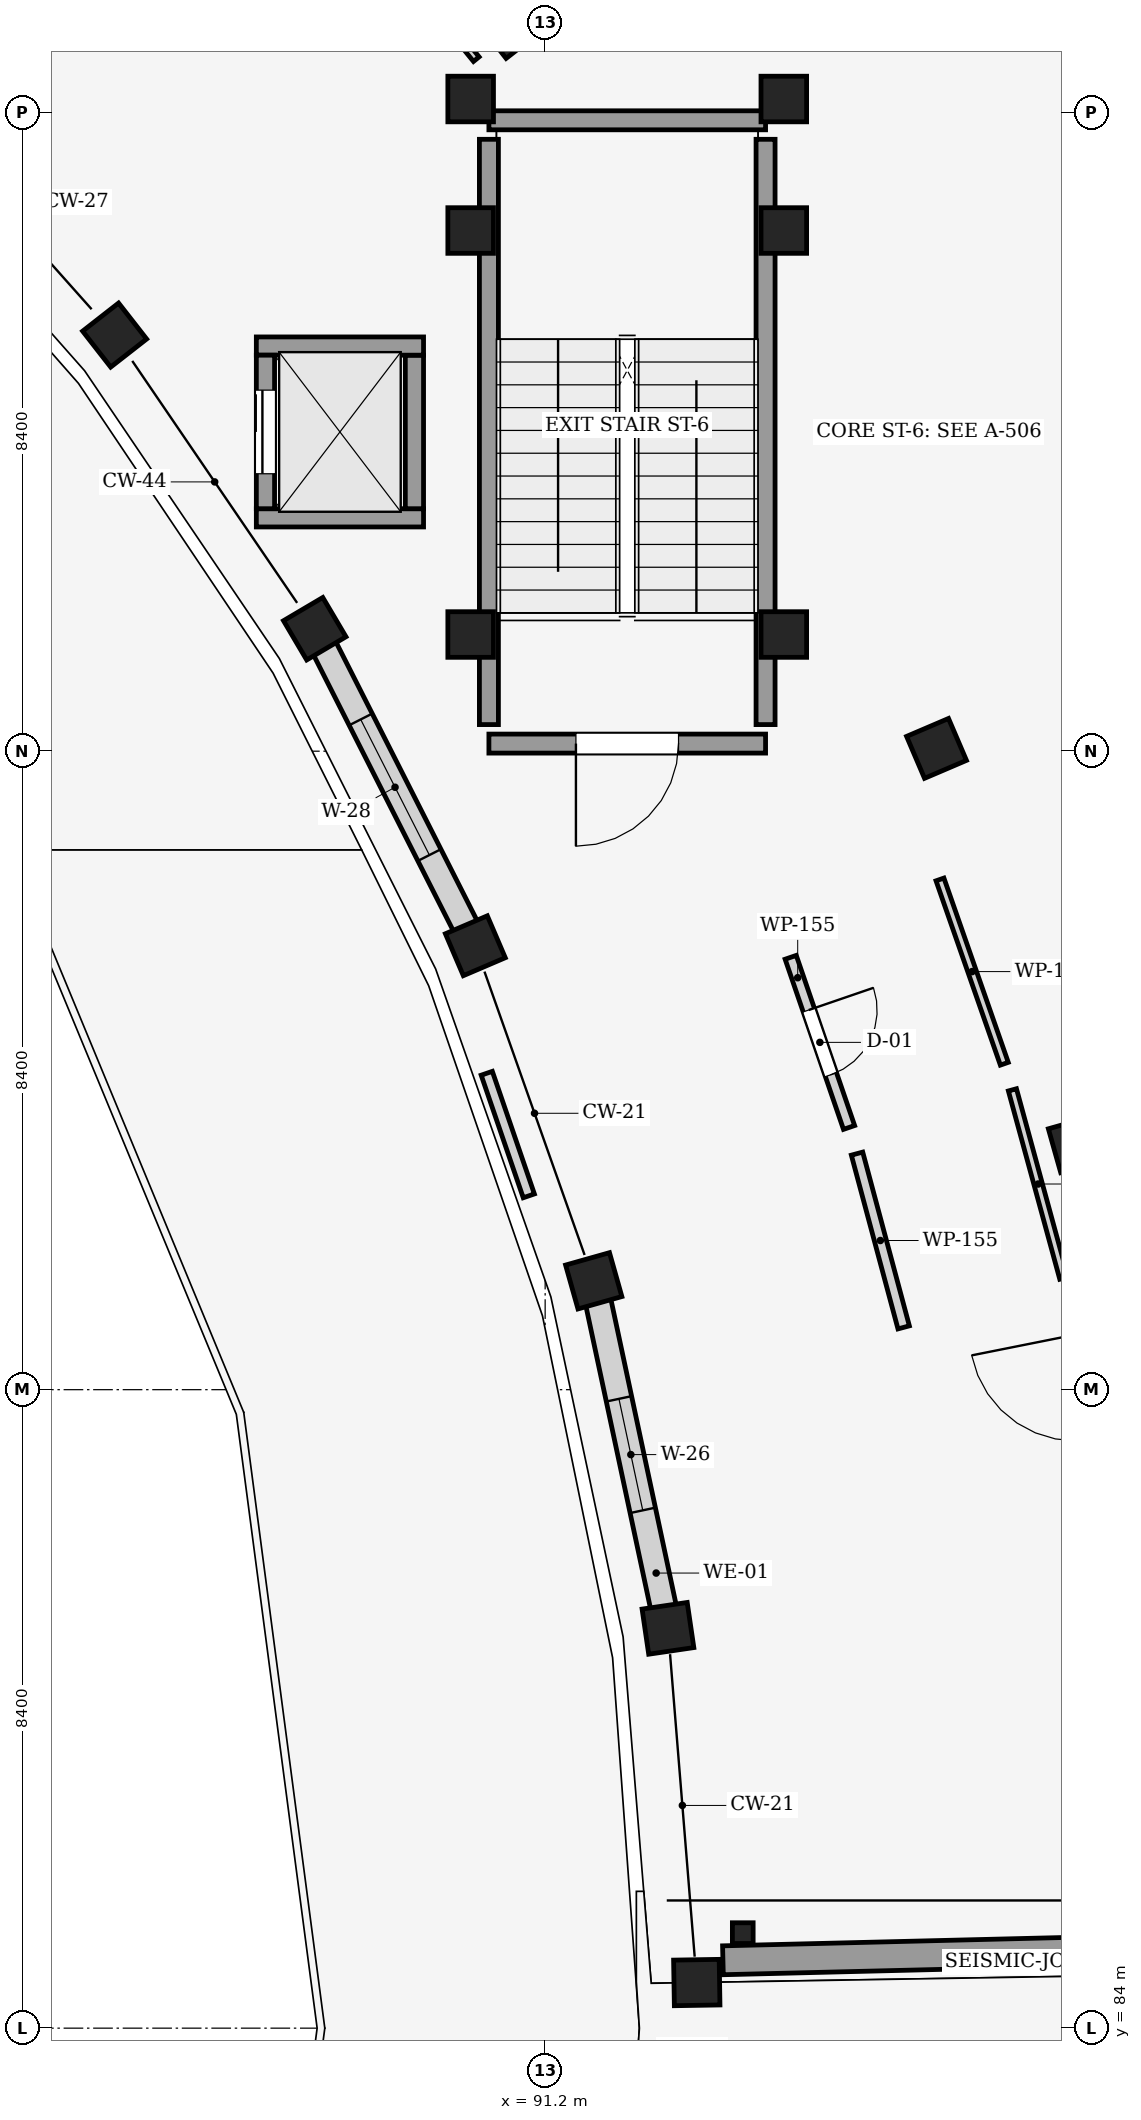
"""IFC4 building model, lengths in metres.
Left out: names, types, materials, properties, quantities, classifications, styles, units other than length and angle.
Written with IfcOpenShell. Run it as: python <this file> out.ifc"""

import sys

from ifc_helpers import new_model, si_unit, direction, frame, frame_2d, origin, origin_2d, place, context, subcontext, project, spatial, rectangle, hollow_circle, extrude, element, fill, save


model = new_model("IFC4")
c1 = context("Model", 3, precision=1e-05, world=origin(), true_north=direction((0.0, 1.0)))
c2 = subcontext(c1, "Body", "Model", "MODEL_VIEW")
j1 = project(units=[si_unit("LENGTHUNIT", "METRE"), si_unit("PLANEANGLEUNIT", "RADIAN")], contexts=[c1])
p1 = place(None, origin())
s1 = spatial("IfcSite", under=j1, at=p1, CompositionType="ELEMENT")
p2 = place(p1, origin())
s2 = spatial("IfcBuilding", under=s1, at=p2, CompositionType="ELEMENT")
p3 = place(p2, frame((0.0, 0.0, 9.15)))
s3 = spatial("IfcBuildingStorey", under=s2, at=p3, CompositionType="ELEMENT", Elevation=9.15)
for number, where, z_axis, x_axis in (
    (1, (93.195, 84.6, 0.0), (0.0, 0.0, 1.0), (1.0, 0.017, 0.0)),
    (2, (92.816, 89.26, 0.0), (0.0, 0.0, 1.0), (0.989, 0.145, 0.0)),
    (3, (91.839, 93.832, 0.0), (0.0, 0.0, 1.0), (0.962, 0.272, 0.0)),
    (4, (98.191, 95.625, 0.0), (0.0, 0.0, 1.0), (0.962, 0.272, 0.0)),
    (5, (90.281, 98.24, 0.0), (0.0, 0.0, 1.0), (0.919, 0.393, 0.0)),
    (6, (96.349, 100.837, 0.0), (0.0, 0.0, 1.0), (0.919, 0.393, 0.0)),
    (7, (88.168, 102.411, 0.0), (0.0, 0.0, 1.0), (0.861, 0.509, 0.0)),
    (8, (85.536, 106.274, 0.0), (0.0, 0.0, 1.0), (0.788, 0.615, 0.0)),
    (9, (90.738, 110.336, 0.0), (0.0, 0.0, 1.0), (0.788, 0.615, 0.0)),
):
    element("IfcColumn", number, at=place(p3, frame(where, z_axis=z_axis, x_axis=x_axis)), inside=s3, PredefinedType="COLUMN", context=c2, shape_type="SweptSolid", body=[
        extrude(rectangle(XDim=0.6, YDim=0.6, at=origin_2d()), origin(), (0.0, 0.0, 1.0), 4.05),
    ])
p4 = place(p3, frame((93.8, 85.25, 0.0), z_axis=(0.0, 0.0, 1.0), x_axis=(1.0, 0.0, 0.0)))
e10 = element("IfcColumn", 10, at=p4, inside=s3, PredefinedType="COLUMN", context=c2, shape_type="SweptSolid", body=[
    extrude(hollow_circle(Radius=0.136, WallThickness=0.016, at=origin_2d()), origin(), (0.0, 0.0, 1.0), 3.82),
])
for number, where, z_axis, x_axis in (
    (11, (94.34, 102.335, 0.0), (0.0, 0.0, 1.0), (1.0, 0.0, 0.0)),
    (12, (90.22, 102.335, 0.0), (0.0, 0.0, 1.0), (1.0, 0.0, 0.0)),
    (13, (94.34, 107.65, 0.0), (0.0, 0.0, 1.0), (1.0, 0.0, 0.0)),
    (14, (90.22, 107.65, 0.0), (0.0, 0.0, 1.0), (1.0, 0.0, 0.0)),
    (15, (94.34, 109.38, 0.0), (0.0, 0.0, 1.0), (1.0, 0.0, 0.0)),
    (16, (90.22, 109.38, 0.0), (0.0, 0.0, 1.0), (1.0, 0.0, 0.0)),
):
    element("IfcColumn", number, at=place(p3, frame(where, z_axis=z_axis, x_axis=x_axis)), inside=s3, PredefinedType="COLUMN", context=c2, shape_type="SweptSolid", body=[
        extrude(rectangle(XDim=0.6, YDim=0.6, at=origin_2d()), origin(), (0.0, 0.0, 1.0), 4.05),
    ])
p5 = place(p3, frame((92.766, 89.495, 0.0), z_axis=(0.0, 0.0, 1.0), x_axis=(-0.208893062569, 0.977938489073, 0.0)))
e17 = element("IfcWall", 17, at=p5, inside=s3, PredefinedType="STANDARD", context=c2, shape_type="SweptSolid", body=[
    extrude(rectangle(XDim=4.195, YDim=0.34, at=frame_2d((2.097, 0.0))), origin(), (0.0, 0.0, 1.0), 3.015),
])
p6 = place(p5, frame((1.347, 0.0, 0.85)))
e18 = element("IfcOpeningElement", 18, at=p6, cuts=e17, PredefinedType="OPENING", context=c2, shape_type="SweptSolid", body=[
    extrude(rectangle(XDim=1.5, YDim=1.85, at=frame_2d((0.75, 0.925))), frame((0.0, 0.18, 0.0), z_axis=(0.0, -1.0, 0.0), x_axis=(1.0, 0.0, 0.0)), (0.0, 0.0, 1.0), 0.36),
])
p7 = place(p3, frame((90.162, 98.475, 0.0), z_axis=(0.0, 0.0, 1.0), x_axis=(-0.451915465701, 0.89206076691, 0.0)))
e19 = element("IfcWall", 19, at=p7, inside=s3, PredefinedType="STANDARD", context=c2, shape_type="SweptSolid", body=[
    extrude(rectangle(XDim=4.148, YDim=0.34, at=frame_2d((2.074, 0.0))), origin(), (0.0, 0.0, 1.0), 3.7),
])
p8 = place(p7, frame((1.074, 0.0, 0.85)))
e20 = element("IfcOpeningElement", 20, at=p8, cuts=e19, PredefinedType="OPENING", context=c2, shape_type="SweptSolid", body=[
    extrude(rectangle(XDim=2.0, YDim=1.85, at=frame_2d((1.0, 0.925))), frame((0.0, 0.18, 0.0), z_axis=(0.0, -1.0, 0.0), x_axis=(1.0, 0.0, 0.0)), (0.0, 0.0, 1.0), 0.36),
])
p9 = place(p3, frame((103.85, 85.145, 0.0), z_axis=(0.0, 0.0, 1.0), x_axis=(-0.999701591947, -0.024427997417, 0.0)))
e21 = element("IfcWall", 21, at=p9, inside=s3, PredefinedType="SHEAR", context=c2, shape_type="SweptSolid", body=[
    extrude(rectangle(XDim=10.314, YDim=0.38, at=frame_2d((5.157, 0.0))), origin(), (0.0, 0.0, 1.0), 3.75),
])
p10 = place(p3, frame((94.1, 100.9, 0.0), z_axis=(0.0, 0.0, 1.0), x_axis=(-1.0, 0.0, 0.0)))
e22 = element("IfcWall", 22, at=p10, inside=s3, PredefinedType="SHEAR", context=c2, shape_type="SweptSolid", body=[
    extrude(rectangle(XDim=3.64, YDim=0.25, at=frame_2d((1.82, 0.0))), origin(), (0.0, 0.0, 1.0), 4.05),
])
p11 = place(p10, frame((1.145, 0.0, 0.0)))
e23 = element("IfcOpeningElement", 23, at=p11, cuts=e22, PredefinedType="OPENING", context=c2, shape_type="SweptSolid", body=[
    extrude(rectangle(XDim=1.35, YDim=2.2, at=frame_2d((0.675, 1.1))), frame((0.0, 0.135, 0.0), z_axis=(0.0, -1.0, 0.0), x_axis=(1.0, 0.0, 0.0)), (0.0, 0.0, 1.0), 0.27),
])
p12 = place(p3, frame((90.46, 101.15, 0.0), z_axis=(0.0, 0.0, 1.0), x_axis=(0.0, 1.0, 0.0)))
e24 = element("IfcWall", 24, at=p12, inside=s3, PredefinedType="SHEAR", context=c2, shape_type="SweptSolid", body=[
    extrude(rectangle(XDim=7.7, YDim=0.25, at=frame_2d((3.85, 0.0))), origin(), (0.0, 0.0, 1.0), 4.05),
])
p13 = place(p3, frame((90.46, 109.1, 0.0), z_axis=(0.0, 0.0, 1.0), x_axis=(1.0, 0.0, 0.0)))
e25 = element("IfcWall", 25, at=p13, inside=s3, PredefinedType="SHEAR", context=c2, shape_type="SweptSolid", body=[
    extrude(rectangle(XDim=3.64, YDim=0.25, at=frame_2d((1.82, 0.0))), origin(), (0.0, 0.0, 1.0), 4.05),
])
p14 = place(p3, frame((94.1, 108.85, 0.0), z_axis=(0.0, 0.0, 1.0), x_axis=(0.0, -1.0, 0.0)))
e26 = element("IfcWall", 26, at=p14, inside=s3, PredefinedType="SHEAR", context=c2, shape_type="SweptSolid", body=[
    extrude(rectangle(XDim=7.7, YDim=0.25, at=frame_2d((3.85, 0.0))), origin(), (0.0, 0.0, 1.0), 4.05),
])
p15 = place(p3, frame((89.6, 103.87, 0.0), z_axis=(0.0, 0.0, 1.0), x_axis=(-1.0, 0.0, 0.0)))
e27 = element("IfcWall", 27, at=p15, inside=s3, PredefinedType="SHEAR", context=c2, shape_type="SweptSolid", body=[
    extrude(rectangle(XDim=2.2, YDim=0.24, at=frame_2d((1.1, 0.0))), origin(), (0.0, 0.0, 1.0), 4.05),
])
p16 = place(p3, frame((89.48, 106.01, 0.0), z_axis=(0.0, 0.0, 1.0), x_axis=(0.0, -1.0, 0.0)))
e28 = element("IfcWall", 28, at=p16, inside=s3, PredefinedType="SHEAR", context=c2, shape_type="SweptSolid", body=[
    extrude(rectangle(XDim=2.02, YDim=0.24, at=frame_2d((1.01, 0.0))), origin(), (0.0, 0.0, 1.0), 4.05),
])
p17 = place(p3, frame((87.4, 106.13, 0.0), z_axis=(0.0, 0.0, 1.0), x_axis=(1.0, 0.0, 0.0)))
e29 = element("IfcWall", 29, at=p17, inside=s3, PredefinedType="SHEAR", context=c2, shape_type="SweptSolid", body=[
    extrude(rectangle(XDim=2.2, YDim=0.24, at=frame_2d((1.1, 0.0))), origin(), (0.0, 0.0, 1.0), 4.05),
])
p18 = place(p3, frame((87.52, 103.99, 0.0), z_axis=(0.0, 0.0, 1.0), x_axis=(0.0, 1.0, 0.0)))
e30 = element("IfcWall", 30, at=p18, inside=s3, PredefinedType="SHEAR", context=c2, shape_type="SweptSolid", body=[
    extrude(rectangle(XDim=2.02, YDim=0.24, at=frame_2d((1.01, 0.0))), origin(), (0.0, 0.0, 1.0), 4.05),
])
p19 = place(p18, frame((0.46, 0.0, 0.0)))
e31 = element("IfcOpeningElement", 31, at=p19, cuts=e30, PredefinedType="OPENING", context=c2, shape_type="SweptSolid", body=[
    extrude(rectangle(XDim=1.1, YDim=2.15, at=frame_2d((0.55, 1.075))), frame((0.0, 0.13, 0.0), z_axis=(0.0, -1.0, 0.0), x_axis=(1.0, 0.0, 0.0)), (0.0, 0.0, 1.0), 0.26),
])
p20 = place(p3, frame((98.024, 93.867, 0.0), z_axis=(0.0, 0.0, 1.0), x_axis=(-0.263415008431, 0.964682607562, 0.0)))
e32 = element("IfcWall", 32, at=p20, inside=s3, PredefinedType="PARTITIONING", context=c2, shape_type="SweptSolid", body=[
    extrude(rectangle(XDim=2.568, YDim=0.11, at=frame_2d((1.284, 0.0))), origin(), (0.0, 0.0, 1.0), 3.015),
])
p21 = place(p3, frame((97.241, 96.688, 0.0), z_axis=(0.0, 0.0, 1.0), x_axis=(-0.32957120556, 0.944130722128, 0.0)))
e33 = element("IfcWall", 33, at=p21, inside=s3, PredefinedType="PARTITIONING", context=c2, shape_type="SweptSolid", body=[
    extrude(rectangle(XDim=2.568, YDim=0.11, at=frame_2d((1.284, 0.0))), origin(), (0.0, 0.0, 1.0), 3.7),
])
p22 = place(p3, frame((90.294, 109.904, 0.0), z_axis=(0.0, 0.0, 1.0), x_axis=(-0.631039893998, 0.775750380073, 0.0)))
e34 = element("IfcWall", 34, at=p22, inside=s3, PredefinedType="PARTITIONING", context=c2, shape_type="SweptSolid", body=[
    extrude(rectangle(XDim=2.198, YDim=0.095, at=frame_2d((1.099, 0.0))), origin(), (0.0, 0.0, 1.0), 3.7),
])
p23 = place(p3, frame((94.431, 98.088, 0.0), z_axis=(0.0, 0.0, 1.0), x_axis=(0.324416625627, -0.945914294752, 0.0)))
e35 = element("IfcWall", 35, at=p23, inside=s3, PredefinedType="PARTITIONING", context=c2, shape_type="SweptSolid", body=[
    extrude(rectangle(XDim=2.367, YDim=0.155, at=frame_2d((1.183, 0.0))), origin(), (0.0, 0.0, 1.0), 3.7),
])
p24 = place(p23, frame((0.733, 0.0, 0.0)))
e36 = element("IfcOpeningElement", 36, at=p24, cuts=e35, PredefinedType="OPENING", context=c2, shape_type="SweptSolid", body=[
    extrude(rectangle(XDim=0.9, YDim=2.1, at=frame_2d((0.45, 1.05))), frame((0.0, 0.087, 0.0), z_axis=(0.0, -1.0, 0.0), x_axis=(1.0, 0.0, 0.0)), (0.0, 0.0, 1.0), 0.175),
])
p25 = place(p3, frame((95.304, 95.506, 0.0), z_axis=(0.0, 0.0, 1.0), x_axis=(0.259100404283, -0.9658503924, 0.0)))
e37 = element("IfcWall", 37, at=p25, inside=s3, PredefinedType="PARTITIONING", context=c2, shape_type="SweptSolid", body=[
    extrude(rectangle(XDim=2.367, YDim=0.155, at=frame_2d((1.184, 0.0))), origin(), (0.0, 0.0, 1.0), 3.015),
])
p26 = place(p3, frame((90.985, 94.95, 0.0), z_axis=(0.0, 0.0, 1.0), x_axis=(-0.324463429437, 0.945898241334, 0.0)))
e38 = element("IfcWall", 38, at=p26, inside=s3, PredefinedType="PARTITIONING", context=c2, shape_type="SweptSolid", body=[
    extrude(rectangle(XDim=1.705, YDim=0.155, at=frame_2d((0.853, 0.0))), origin(), (0.0, 0.0, 1.0), 3.165),
])
p27 = place(p6, origin())
e39 = element("IfcWindow", 39, at=p27, inside=s3, PartitioningType="SINGLE_PANEL", PredefinedType="WINDOW", context=c2, shape_type="SweptSolid", body=[
    extrude(rectangle(XDim=1.5, YDim=1.85, at=frame_2d((0.75, 0.925))), frame((0.0, 0.03, 0.0), z_axis=(0.0, -1.0, 0.0), x_axis=(1.0, 0.0, 0.0)), (0.0, 0.0, 1.0), 0.06),
])
fill(e18, e39)
p28 = place(p8, origin())
e40 = element("IfcWindow", 40, at=p28, inside=s3, PartitioningType="SINGLE_PANEL", PredefinedType="WINDOW", context=c2, shape_type="SweptSolid", body=[
    extrude(rectangle(XDim=2.0, YDim=1.85, at=frame_2d((1.0, 0.925))), frame((0.0, 0.03, 0.0), z_axis=(0.0, -1.0, 0.0), x_axis=(1.0, 0.0, 0.0)), (0.0, 0.0, 1.0), 0.06),
])
fill(e20, e40)
p29 = place(p11, origin())
e41 = element("IfcDoor", 41, at=p29, inside=s3, OperationType="SINGLE_SWING_RIGHT", PredefinedType="DOOR", context=c2, shape_type="SweptSolid", body=[
    extrude(rectangle(XDim=1.35, YDim=2.2, at=frame_2d((0.675, 1.1))), frame((0.0, 0.025, 0.0), z_axis=(0.0, -1.0, 0.0), x_axis=(1.0, 0.0, 0.0)), (0.0, 0.0, 1.0), 0.05),
])
fill(e23, e41)
p30 = place(p19, origin())
e42 = element("IfcDoor", 42, at=p30, inside=s3, OperationType="SLIDING_TO_RIGHT", PredefinedType="DOOR", context=c2, shape_type="SweptSolid", body=[
    extrude(rectangle(XDim=1.1, YDim=2.15, at=frame_2d((0.55, 1.075))), frame((0.0, 0.025, 0.0), z_axis=(0.0, -1.0, 0.0), x_axis=(1.0, 0.0, 0.0)), (0.0, 0.0, 1.0), 0.05),
])
fill(e31, e42)
p31 = place(p24, origin())
e43 = element("IfcDoor", 43, at=p31, inside=s3, OperationType="SINGLE_SWING_LEFT", PredefinedType="DOOR", context=c2, shape_type="SweptSolid", body=[
    extrude(rectangle(XDim=0.9, YDim=2.1, at=frame_2d((0.45, 1.05))), frame((0.0, 0.025, 0.0), z_axis=(0.0, -1.0, 0.0), x_axis=(1.0, 0.0, 0.0)), (0.0, 0.0, 1.0), 0.05),
])
fill(e36, e43)
save(model, sys.argv[1])
